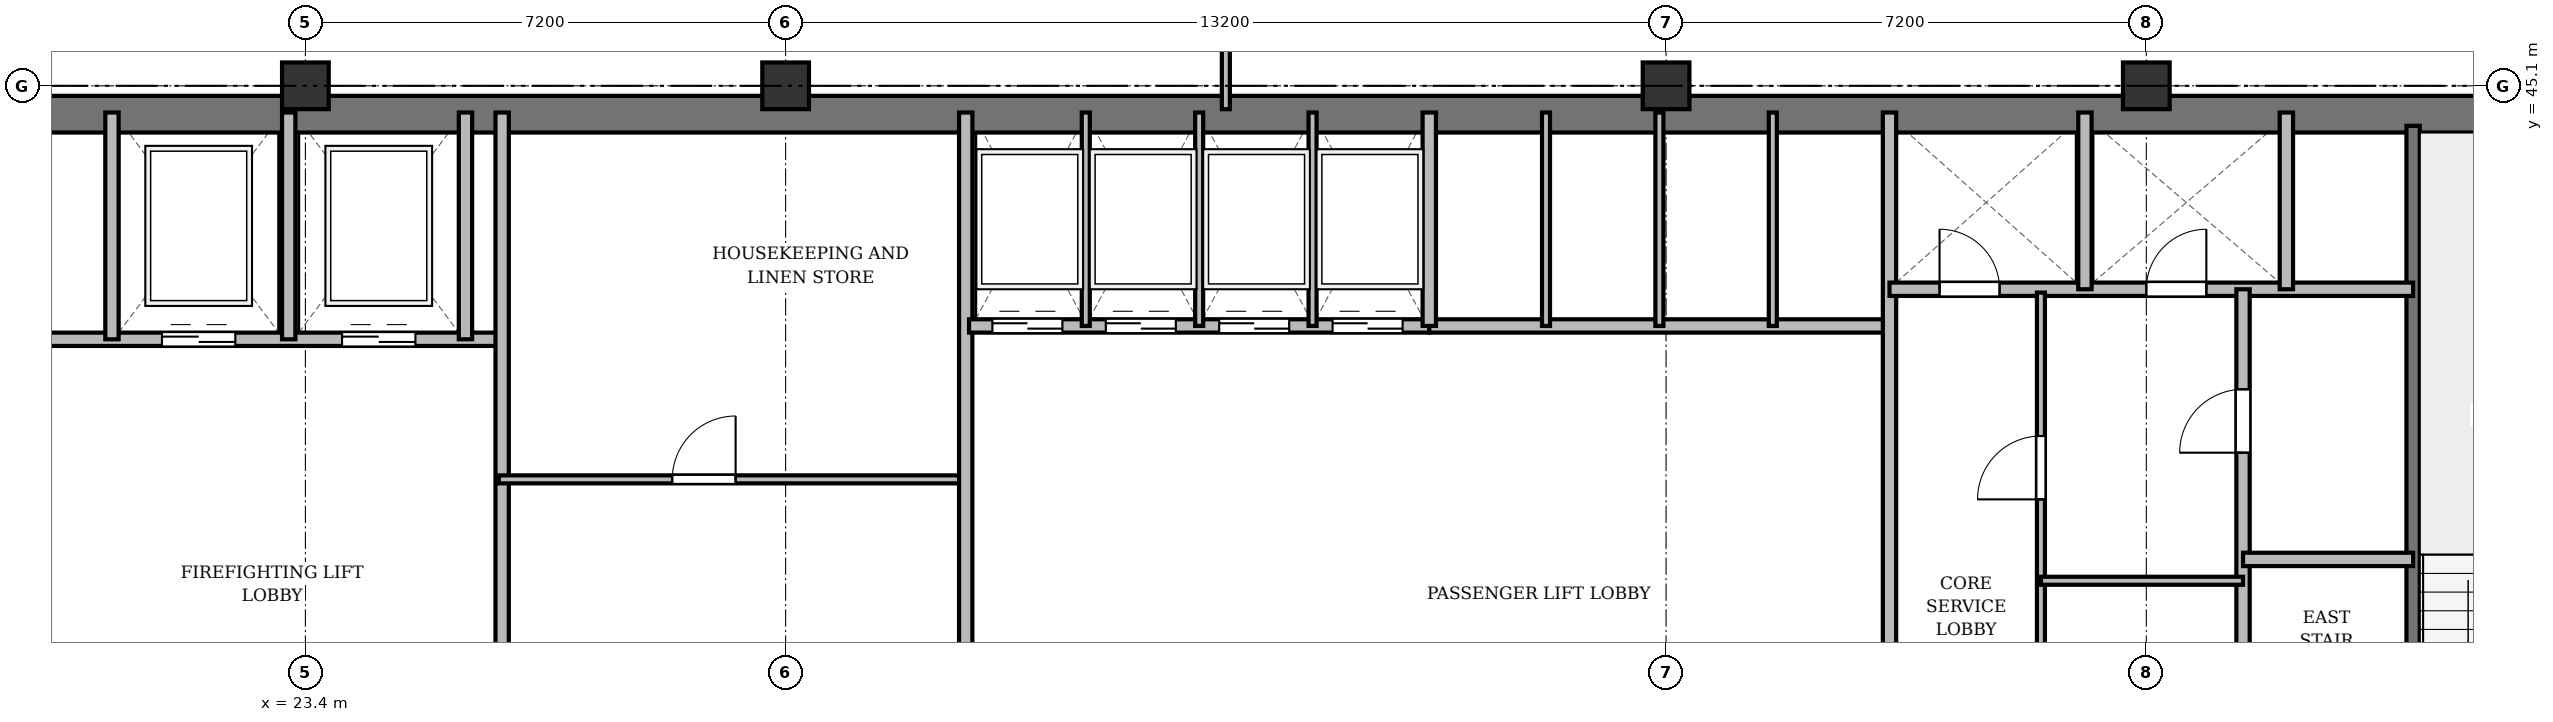
"""IFC4 building model, lengths in metres.
Left out: names, types, materials, properties, quantities, classifications, styles, units other than length and angle.
Written with IfcOpenShell. Run it as: python <this file> out.ifc"""

import sys

from ifc_helpers import new_model, si_unit, direction, frame, frame_2d, origin, origin_2d, place, context, subcontext, project, spatial, rectangle, extrude, source, transform, mapped, element, fill, save


model = new_model("IFC4")
c1 = context("Model", 3, precision=1e-05, world=origin(), true_north=direction((0.0, 1.0)))
c2 = subcontext(c1, "Body", "Model", "MODEL_VIEW")
j1 = project(units=[si_unit("LENGTHUNIT", "METRE"), si_unit("PLANEANGLEUNIT", "RADIAN")], contexts=[c1])
p1 = place(None, origin())
s1 = spatial("IfcSite", under=j1, at=p1, CompositionType="ELEMENT")
p2 = place(p1, origin())
s2 = spatial("IfcBuilding", under=s1, at=p2, CompositionType="ELEMENT")
p3 = place(p2, frame((0.0, 0.0, 197.7)))
s3 = spatial("IfcBuildingStorey", under=s2, at=p3, CompositionType="ELEMENT", Elevation=197.7)
m1 = source(origin(), c2, "Body", "SweptSolid", [
    extrude(rectangle(XDim=0.7, YDim=0.7, at=origin_2d()), origin(), (0.0, 0.0, 1.0), 3.6),
])
for number, where, z_axis, x_axis in (
    (1, (23.4, 45.1, 0.0), (0.0, 0.0, 1.0), (1.0, 0.0, 0.0)),
    (2, (30.6, 45.1, 0.0), (0.0, 0.0, 1.0), (1.0, 0.0, 0.0)),
    (3, (43.8, 45.1, 0.0), (0.0, 0.0, 1.0), (1.0, 0.0, 0.0)),
    (4, (51.0, 45.1, 0.0), (0.0, 0.0, 1.0), (1.0, 0.0, 0.0)),
):
    element("IfcColumn", number, at=place(p3, frame(where, z_axis=z_axis, x_axis=x_axis)), inside=s3, PredefinedType="COLUMN", context=c2, shape_type="MappedRepresentation", body=[
        mapped(m1, transform((0.0, 0.0, 0.0), x_axis=(1.0, 0.0, 0.0), y_axis=(0.0, 1.0, 0.0), z_axis=(0.0, 0.0, 1.0), scale=1.0)),
    ])
p4 = place(p3, frame((15.65, 44.675, 0.0), z_axis=(0.0, 0.0, 1.0), x_axis=(1.0, 0.0, 0.0)))
e5 = element("IfcWall", 5, at=p4, inside=s3, PredefinedType="SHEAR", context=c2, shape_type="SweptSolid", body=[
    extrude(rectangle(XDim=43.1, YDim=0.55, at=frame_2d((21.55, 0.0))), origin(), (0.0, 0.0, 1.0), 3.36),
])
p5 = place(p3, frame((55.0, 33.4, 0.0), z_axis=(0.0, 0.0, 1.0), x_axis=(0.0, 1.0, 0.0)))
e6 = element("IfcWall", 6, at=p5, inside=s3, PredefinedType="SHEAR", context=c2, shape_type="SweptSolid", body=[
    extrude(rectangle(XDim=11.1, YDim=0.2, at=frame_2d((5.55, 0.0))), origin(), (0.0, 0.0, 1.0), 3.36),
])
p6 = place(p5, frame((0.85, 0.0, 0.0)))
e7 = element("IfcOpeningElement", 7, at=p6, cuts=e6, PredefinedType="OPENING", context=c2, shape_type="SweptSolid", body=[
    extrude(rectangle(XDim=1.1, YDim=2.15, at=frame_2d((0.55, 1.075))), frame((0.0, 0.11, 0.0), z_axis=(0.0, -1.0, 0.0), x_axis=(1.0, 0.0, 0.0)), (0.0, 0.0, 1.0), 0.22),
])
p7 = place(p3, frame((19.55, 41.3, 0.0), z_axis=(0.0, 0.0, 1.0), x_axis=(1.0, 0.0, 0.0)))
e8 = element("IfcWall", 8, at=p7, inside=s3, PredefinedType="SOLIDWALL", context=c2, shape_type="SweptSolid", body=[
    extrude(rectangle(XDim=6.75, YDim=0.2, at=frame_2d((3.375, 0.0))), origin(), (0.0, 0.0, 1.0), 3.36),
])
p8 = place(p7, frame((1.7, 0.0, 0.0)))
e9 = element("IfcOpeningElement", 9, at=p8, cuts=e8, PredefinedType="OPENING", context=c2, shape_type="SweptSolid", body=[
    extrude(rectangle(XDim=1.1, YDim=2.15, at=frame_2d((0.55, 1.075))), frame((0.0, 0.11, 0.0), z_axis=(0.0, -1.0, 0.0), x_axis=(1.0, 0.0, 0.0)), (0.0, 0.0, 1.0), 0.22),
])
p9 = place(p7, frame((4.4, 0.0, 0.0)))
e10 = element("IfcOpeningElement", 10, at=p9, cuts=e8, PredefinedType="OPENING", context=c2, shape_type="SweptSolid", body=[
    extrude(rectangle(XDim=1.1, YDim=2.15, at=frame_2d((0.55, 1.075))), frame((0.0, 0.11, 0.0), z_axis=(0.0, -1.0, 0.0), x_axis=(1.0, 0.0, 0.0)), (0.0, 0.0, 1.0), 0.22),
])
for number, where, z_axis, x_axis in (
    (11, (20.5, 41.3, 0.0), (0.0, 0.0, 1.0), (0.0, 1.0, 0.0)),
    (12, (23.15, 41.3, 0.0), (0.0, 0.0, 1.0), (0.0, 1.0, 0.0)),
    (13, (25.8, 41.3, 0.0), (0.0, 0.0, 1.0), (0.0, 1.0, 0.0)),
):
    element("IfcWall", number, at=place(p3, frame(where, z_axis=z_axis, x_axis=x_axis)), inside=s3, PredefinedType="SOLIDWALL", context=c2, shape_type="SweptSolid", body=[
        extrude(rectangle(XDim=3.4, YDim=0.2, at=frame_2d((1.7, 0.0))), origin(), (0.0, 0.0, 1.0), 3.36),
    ])
p10 = place(p3, frame((26.35, 33.4, 0.0), z_axis=(0.0, 0.0, 1.0), x_axis=(0.0, 1.0, 0.0)))
e14 = element("IfcWall", 14, at=p10, inside=s3, PredefinedType="SOLIDWALL", context=c2, shape_type="SweptSolid", body=[
    extrude(rectangle(XDim=11.3, YDim=0.2, at=frame_2d((5.65, 0.0))), origin(), (0.0, 0.0, 1.0), 2.91),
])
p11 = place(p3, frame((26.3, 39.2, 0.0), z_axis=(0.0, 0.0, 1.0), x_axis=(1.0, 0.0, 0.0)))
e15 = element("IfcWall", 15, at=p11, inside=s3, PredefinedType="PARTITIONING", context=c2, shape_type="SweptSolid", body=[
    extrude(rectangle(XDim=7.0, YDim=0.12, at=frame_2d((3.5, 0.0))), origin(), (0.0, 0.0, 1.0), 2.86),
])
p12 = place(p11, frame((2.6, 0.0, 0.0)))
e16 = element("IfcOpeningElement", 16, at=p12, cuts=e15, PredefinedType="OPENING", context=c2, shape_type="SweptSolid", body=[
    extrude(rectangle(XDim=0.95, YDim=2.15, at=frame_2d((0.475, 1.075))), frame((0.0, 0.07, 0.0), z_axis=(0.0, -1.0, 0.0), x_axis=(1.0, 0.0, 0.0)), (0.0, 0.0, 1.0), 0.14),
])
p13 = place(p3, frame((33.3, 33.4, 0.0), z_axis=(0.0, 0.0, 1.0), x_axis=(0.0, 1.0, 0.0)))
e17 = element("IfcWall", 17, at=p13, inside=s3, PredefinedType="SOLIDWALL", context=c2, shape_type="SweptSolid", body=[
    extrude(rectangle(XDim=11.3, YDim=0.2, at=frame_2d((5.65, 0.0))), origin(), (0.0, 0.0, 1.0), 2.91),
])
p14 = place(p3, frame((33.35, 41.5, 0.0), z_axis=(0.0, 0.0, 1.0), x_axis=(1.0, 0.0, 0.0)))
e18 = element("IfcWall", 18, at=p14, inside=s3, PredefinedType="SOLIDWALL", context=c2, shape_type="SweptSolid", body=[
    extrude(rectangle(XDim=6.9, YDim=0.2, at=frame_2d((3.45, 0.0))), origin(), (0.0, 0.0, 1.0), 3.36),
])
p15 = place(p14, frame((0.35, 0.0, 0.0)))
e19 = element("IfcOpeningElement", 19, at=p15, cuts=e18, PredefinedType="OPENING", context=c2, shape_type="SweptSolid", body=[
    extrude(rectangle(XDim=1.05, YDim=2.15, at=frame_2d((0.525, 1.075))), frame((0.0, 0.11, 0.0), z_axis=(0.0, -1.0, 0.0), x_axis=(1.0, 0.0, 0.0)), (0.0, 0.0, 1.0), 0.22),
])
p16 = place(p14, frame((2.05, 0.0, 0.0)))
e20 = element("IfcOpeningElement", 20, at=p16, cuts=e18, PredefinedType="OPENING", context=c2, shape_type="SweptSolid", body=[
    extrude(rectangle(XDim=1.05, YDim=2.15, at=frame_2d((0.525, 1.075))), frame((0.0, 0.11, 0.0), z_axis=(0.0, -1.0, 0.0), x_axis=(1.0, 0.0, 0.0)), (0.0, 0.0, 1.0), 0.22),
])
p17 = place(p14, frame((3.75, 0.0, 0.0)))
e21 = element("IfcOpeningElement", 21, at=p17, cuts=e18, PredefinedType="OPENING", context=c2, shape_type="SweptSolid", body=[
    extrude(rectangle(XDim=1.05, YDim=2.15, at=frame_2d((0.525, 1.075))), frame((0.0, 0.11, 0.0), z_axis=(0.0, -1.0, 0.0), x_axis=(1.0, 0.0, 0.0)), (0.0, 0.0, 1.0), 0.22),
])
p18 = place(p14, frame((5.45, 0.0, 0.0)))
e22 = element("IfcOpeningElement", 22, at=p18, cuts=e18, PredefinedType="OPENING", context=c2, shape_type="SweptSolid", body=[
    extrude(rectangle(XDim=1.05, YDim=2.15, at=frame_2d((0.525, 1.075))), frame((0.0, 0.11, 0.0), z_axis=(0.0, -1.0, 0.0), x_axis=(1.0, 0.0, 0.0)), (0.0, 0.0, 1.0), 0.22),
])
for number, where, z_axis, x_axis in (
    (23, (35.1, 41.5, 0.0), (0.0, 0.0, 1.0), (0.0, 1.0, 0.0)),
    (24, (36.8, 41.5, 0.0), (0.0, 0.0, 1.0), (0.0, 1.0, 0.0)),
    (25, (38.5, 41.5, 0.0), (0.0, 0.0, 1.0), (0.0, 1.0, 0.0)),
):
    element("IfcWall", number, at=place(p3, frame(where, z_axis=z_axis, x_axis=x_axis)), inside=s3, PredefinedType="PARTITIONING", context=c2, shape_type="SweptSolid", body=[
        extrude(rectangle(XDim=3.2, YDim=0.12, at=frame_2d((1.6, 0.0))), origin(), (0.0, 0.0, 1.0), 3.36),
    ])
p19 = place(p3, frame((40.25, 41.5, 0.0), z_axis=(0.0, 0.0, 1.0), x_axis=(1.0, 0.0, 0.0)))
e26 = element("IfcWall", 26, at=p19, inside=s3, PredefinedType="SOLIDWALL", context=c2, shape_type="SweptSolid", body=[
    extrude(rectangle(XDim=6.9, YDim=0.2, at=frame_2d((3.45, 0.0))), origin(), (0.0, 0.0, 1.0), 2.86),
])
p20 = place(p3, frame((40.25, 41.5, 0.0), z_axis=(0.0, 0.0, 1.0), x_axis=(0.0, 1.0, 0.0)))
e27 = element("IfcWall", 27, at=p20, inside=s3, PredefinedType="SOLIDWALL", context=c2, shape_type="SweptSolid", body=[
    extrude(rectangle(XDim=3.2, YDim=0.2, at=frame_2d((1.6, 0.0))), origin(), (0.0, 0.0, 1.0), 3.36),
])
p21 = place(p3, frame((42.0, 41.5, 0.0), z_axis=(0.0, 0.0, 1.0), x_axis=(0.0, 1.0, 0.0)))
e28 = element("IfcWall", 28, at=p21, inside=s3, PredefinedType="PARTITIONING", context=c2, shape_type="SweptSolid", body=[
    extrude(rectangle(XDim=3.2, YDim=0.12, at=frame_2d((1.6, 0.0))), origin(), (0.0, 0.0, 1.0), 3.36),
])
p22 = place(p3, frame((43.7, 41.5, 0.0), z_axis=(0.0, 0.0, 1.0), x_axis=(0.0, 1.0, 0.0)))
e29 = element("IfcWall", 29, at=p22, inside=s3, PredefinedType="PARTITIONING", context=c2, shape_type="SweptSolid", body=[
    extrude(rectangle(XDim=3.2, YDim=0.12, at=frame_2d((1.6, 0.0))), origin(), (0.0, 0.0, 1.0), 2.86),
])
p23 = place(p3, frame((45.4, 41.5, 0.0), z_axis=(0.0, 0.0, 1.0), x_axis=(0.0, 1.0, 0.0)))
e30 = element("IfcWall", 30, at=p23, inside=s3, PredefinedType="PARTITIONING", context=c2, shape_type="SweptSolid", body=[
    extrude(rectangle(XDim=3.2, YDim=0.12, at=frame_2d((1.6, 0.0))), origin(), (0.0, 0.0, 1.0), 3.36),
])
p24 = place(p3, frame((47.15, 33.4, 0.0), z_axis=(0.0, 0.0, 1.0), x_axis=(0.0, 1.0, 0.0)))
e31 = element("IfcWall", 31, at=p24, inside=s3, PredefinedType="SOLIDWALL", context=c2, shape_type="SweptSolid", body=[
    extrude(rectangle(XDim=11.3, YDim=0.2, at=frame_2d((5.65, 0.0))), origin(), (0.0, 0.0, 1.0), 2.91),
])
p25 = place(p3, frame((47.15, 42.05, 0.0), z_axis=(0.0, 0.0, 1.0), x_axis=(1.0, 0.0, 0.0)))
e32 = element("IfcWall", 32, at=p25, inside=s3, PredefinedType="SOLIDWALL", context=c2, shape_type="SweptSolid", body=[
    extrude(rectangle(XDim=7.85, YDim=0.2, at=frame_2d((3.925, 0.0))), origin(), (0.0, 0.0, 1.0), 2.86),
])
p26 = place(p25, frame((0.75, 0.0, 0.0)))
e33 = element("IfcOpeningElement", 33, at=p26, cuts=e32, PredefinedType="OPENING", context=c2, shape_type="SweptSolid", body=[
    extrude(rectangle(XDim=0.9, YDim=2.1, at=frame_2d((0.45, 1.05))), frame((0.0, 0.11, 0.0), z_axis=(0.0, -1.0, 0.0), x_axis=(1.0, 0.0, 0.0)), (0.0, 0.0, 1.0), 0.22),
])
p27 = place(p25, frame((3.85, 0.0, 0.0)))
e34 = element("IfcOpeningElement", 34, at=p27, cuts=e32, PredefinedType="OPENING", context=c2, shape_type="SweptSolid", body=[
    extrude(rectangle(XDim=0.9, YDim=2.1, at=frame_2d((0.45, 1.05))), frame((0.0, 0.11, 0.0), z_axis=(0.0, -1.0, 0.0), x_axis=(1.0, 0.0, 0.0)), (0.0, 0.0, 1.0), 0.22),
])
for number, where, z_axis, x_axis in (
    (35, (50.08, 42.05, 0.0), (0.0, 0.0, 1.0), (0.0, 1.0, 0.0)),
    (36, (53.1, 42.05, 0.0), (0.0, 0.0, 1.0), (0.0, 1.0, 0.0)),
):
    element("IfcWall", number, at=place(p3, frame(where, z_axis=z_axis, x_axis=x_axis)), inside=s3, PredefinedType="SOLIDWALL", context=c2, shape_type="SweptSolid", body=[
        extrude(rectangle(XDim=2.65, YDim=0.2, at=frame_2d((1.325, 0.0))), origin(), (0.0, 0.0, 1.0), 3.36),
    ])
p28 = place(p3, frame((52.45, 33.4, 0.0), z_axis=(0.0, 0.0, 1.0), x_axis=(0.0, 1.0, 0.0)))
e37 = element("IfcWall", 37, at=p28, inside=s3, PredefinedType="PARTITIONING", context=c2, shape_type="SweptSolid", body=[
    extrude(rectangle(XDim=8.65, YDim=0.2, at=frame_2d((4.325, 0.0))), origin(), (0.0, 0.0, 1.0), 2.91),
])
p29 = place(p28, frame((6.2, 0.0, 0.0)))
e38 = element("IfcOpeningElement", 38, at=p29, cuts=e37, PredefinedType="OPENING", context=c2, shape_type="SweptSolid", body=[
    extrude(rectangle(XDim=0.95, YDim=2.15, at=frame_2d((0.475, 1.075))), frame((0.0, 0.11, 0.0), z_axis=(0.0, -1.0, 0.0), x_axis=(1.0, 0.0, 0.0)), (0.0, 0.0, 1.0), 0.22),
])
p30 = place(p3, frame((52.45, 38.0, 0.0), z_axis=(0.0, 0.0, 1.0), x_axis=(1.0, 0.0, 0.0)))
e39 = element("IfcWall", 39, at=p30, inside=s3, PredefinedType="PARTITIONING", context=c2, shape_type="SweptSolid", body=[
    extrude(rectangle(XDim=2.55, YDim=0.2, at=frame_2d((1.275, 0.0))), origin(), (0.0, 0.0, 1.0), 3.36),
])
p31 = place(p3, frame((49.42, 33.4, 0.0), z_axis=(0.0, 0.0, 1.0), x_axis=(0.0, 1.0, 0.0)))
e40 = element("IfcWall", 40, at=p31, inside=s3, PredefinedType="PARTITIONING", context=c2, shape_type="SweptSolid", body=[
    extrude(rectangle(XDim=8.6, YDim=0.12, at=frame_2d((4.3, 0.0))), origin(), (0.0, 0.0, 1.0), 2.91),
])
p32 = place(p31, frame((1.3, 0.0, 0.0)))
e41 = element("IfcOpeningElement", 41, at=p32, cuts=e40, PredefinedType="OPENING", context=c2, shape_type="SweptSolid", body=[
    extrude(rectangle(XDim=0.95, YDim=2.15, at=frame_2d((0.475, 1.075))), frame((0.0, 0.07, 0.0), z_axis=(0.0, -1.0, 0.0), x_axis=(1.0, 0.0, 0.0)), (0.0, 0.0, 1.0), 0.14),
])
p33 = place(p31, frame((5.5, 0.0, 0.0)))
e42 = element("IfcOpeningElement", 42, at=p33, cuts=e40, PredefinedType="OPENING", context=c2, shape_type="SweptSolid", body=[
    extrude(rectangle(XDim=0.95, YDim=2.15, at=frame_2d((0.475, 1.075))), frame((0.0, 0.07, 0.0), z_axis=(0.0, -1.0, 0.0), x_axis=(1.0, 0.0, 0.0)), (0.0, 0.0, 1.0), 0.14),
])
p34 = place(p3, frame((49.42, 37.68, 0.0), z_axis=(0.0, 0.0, 1.0), x_axis=(1.0, 0.0, 0.0)))
e43 = element("IfcWall", 43, at=p34, inside=s3, PredefinedType="PARTITIONING", context=c2, shape_type="SweptSolid", body=[
    extrude(rectangle(XDim=3.03, YDim=0.12, at=frame_2d((1.515, 0.0))), origin(), (0.0, 0.0, 1.0), 2.86),
])
p35 = place(p3, frame((37.2, 44.75, 0.0), z_axis=(0.0, 0.0, 1.0), x_axis=(0.0, 1.0, 0.0)))
e44 = element("IfcWall", 44, at=p35, inside=s3, PredefinedType="PARTITIONING", context=c2, shape_type="SweptSolid", body=[
    extrude(rectangle(XDim=3.61, YDim=0.12, at=frame_2d((1.805, 0.0))), origin(), (0.0, 0.0, 1.0), 2.91),
])
p36 = place(p35, frame((1.1, 0.0, 0.0)))
e45 = element("IfcOpeningElement", 45, at=p36, cuts=e44, PredefinedType="OPENING", context=c2, shape_type="SweptSolid", body=[
    extrude(rectangle(XDim=0.95, YDim=2.15, at=frame_2d((0.475, 1.075))), frame((0.0, 0.07, 0.0), z_axis=(0.0, -1.0, 0.0), x_axis=(1.0, 0.0, 0.0)), (0.0, 0.0, 1.0), 0.14),
])
m2 = source(origin(), c2, "Body", "SweptSolid", [
    extrude(rectangle(XDim=1.1, YDim=2.15, at=frame_2d((0.55, 1.075))), frame((0.0, 0.025, 0.0), z_axis=(0.0, -1.0, 0.0), x_axis=(1.0, 0.0, 0.0)), (0.0, 0.0, 1.0), 0.05),
])
p37 = place(p8, origin())
e46 = element("IfcDoor", 46, at=p37, inside=s3, OperationType="DOUBLE_DOOR_SLIDING", PredefinedType="DOOR", context=c2, shape_type="MappedRepresentation", body=[
    mapped(m2, transform((0.0, 0.0, 0.0), x_axis=(1.0, 0.0, 0.0), y_axis=(0.0, 1.0, 0.0), z_axis=(0.0, 0.0, 1.0), scale=1.0)),
])
fill(e9, e46)
p38 = place(p9, origin())
e47 = element("IfcDoor", 47, at=p38, inside=s3, OperationType="DOUBLE_DOOR_SLIDING", PredefinedType="DOOR", context=c2, shape_type="MappedRepresentation", body=[
    mapped(m2, transform((0.0, 0.0, 0.0), x_axis=(1.0, 0.0, 0.0), y_axis=(0.0, 1.0, 0.0), z_axis=(0.0, 0.0, 1.0), scale=1.0)),
])
fill(e10, e47)
m3 = source(origin(), c2, "Body", "SweptSolid", [
    extrude(rectangle(XDim=0.95, YDim=2.15, at=frame_2d((0.475, 1.075))), frame((0.0, 0.025, 0.0), z_axis=(0.0, -1.0, 0.0), x_axis=(1.0, 0.0, 0.0)), (0.0, 0.0, 1.0), 0.05),
])
p39 = place(p12, origin())
e48 = element("IfcDoor", 48, at=p39, inside=s3, OperationType="SINGLE_SWING_RIGHT", PredefinedType="DOOR", context=c2, shape_type="MappedRepresentation", body=[
    mapped(m3, transform((0.0, 0.0, 0.0), x_axis=(1.0, 0.0, 0.0), y_axis=(0.0, 1.0, 0.0), z_axis=(0.0, 0.0, 1.0), scale=1.0)),
])
fill(e16, e48)
m4 = source(origin(), c2, "Body", "SweptSolid", [
    extrude(rectangle(XDim=1.05, YDim=2.15, at=frame_2d((0.525, 1.075))), frame((0.0, 0.025, 0.0), z_axis=(0.0, -1.0, 0.0), x_axis=(1.0, 0.0, 0.0)), (0.0, 0.0, 1.0), 0.05),
])
p40 = place(p15, origin())
e49 = element("IfcDoor", 49, at=p40, inside=s3, OperationType="DOUBLE_DOOR_SLIDING", PredefinedType="DOOR", context=c2, shape_type="MappedRepresentation", body=[
    mapped(m4, transform((0.0, 0.0, 0.0), x_axis=(1.0, 0.0, 0.0), y_axis=(0.0, 1.0, 0.0), z_axis=(0.0, 0.0, 1.0), scale=1.0)),
])
fill(e19, e49)
p41 = place(p16, origin())
e50 = element("IfcDoor", 50, at=p41, inside=s3, OperationType="DOUBLE_DOOR_SLIDING", PredefinedType="DOOR", context=c2, shape_type="MappedRepresentation", body=[
    mapped(m4, transform((0.0, 0.0, 0.0), x_axis=(1.0, 0.0, 0.0), y_axis=(0.0, 1.0, 0.0), z_axis=(0.0, 0.0, 1.0), scale=1.0)),
])
fill(e20, e50)
p42 = place(p17, origin())
e51 = element("IfcDoor", 51, at=p42, inside=s3, OperationType="DOUBLE_DOOR_SLIDING", PredefinedType="DOOR", context=c2, shape_type="MappedRepresentation", body=[
    mapped(m4, transform((0.0, 0.0, 0.0), x_axis=(1.0, 0.0, 0.0), y_axis=(0.0, 1.0, 0.0), z_axis=(0.0, 0.0, 1.0), scale=1.0)),
])
fill(e21, e51)
p43 = place(p18, origin())
e52 = element("IfcDoor", 52, at=p43, inside=s3, OperationType="DOUBLE_DOOR_SLIDING", PredefinedType="DOOR", context=c2, shape_type="MappedRepresentation", body=[
    mapped(m4, transform((0.0, 0.0, 0.0), x_axis=(1.0, 0.0, 0.0), y_axis=(0.0, 1.0, 0.0), z_axis=(0.0, 0.0, 1.0), scale=1.0)),
])
fill(e22, e52)
m5 = source(origin(), c2, "Body", "SweptSolid", [
    extrude(rectangle(XDim=0.9, YDim=2.1, at=frame_2d((0.45, 1.05))), frame((0.0, 0.025, 0.0), z_axis=(0.0, -1.0, 0.0), x_axis=(1.0, 0.0, 0.0)), (0.0, 0.0, 1.0), 0.05),
])
p44 = place(p26, origin())
e53 = element("IfcDoor", 53, at=p44, inside=s3, OperationType="SINGLE_SWING_LEFT", PredefinedType="DOOR", context=c2, shape_type="MappedRepresentation", body=[
    mapped(m5, transform((0.0, 0.0, 0.0), x_axis=(1.0, 0.0, 0.0), y_axis=(0.0, 1.0, 0.0), z_axis=(0.0, 0.0, 1.0), scale=1.0)),
])
fill(e33, e53)
p45 = place(p27, origin())
e54 = element("IfcDoor", 54, at=p45, inside=s3, OperationType="SINGLE_SWING_RIGHT", PredefinedType="DOOR", context=c2, shape_type="MappedRepresentation", body=[
    mapped(m5, transform((0.0, 0.0, 0.0), x_axis=(1.0, 0.0, 0.0), y_axis=(0.0, 1.0, 0.0), z_axis=(0.0, 0.0, 1.0), scale=1.0)),
])
fill(e34, e54)
p46 = place(p29, origin())
e55 = element("IfcDoor", 55, at=p46, inside=s3, OperationType="SINGLE_SWING_LEFT", PredefinedType="DOOR", context=c2, shape_type="MappedRepresentation", body=[
    mapped(m3, transform((0.0, 0.0, 0.0), x_axis=(1.0, 0.0, 0.0), y_axis=(0.0, 1.0, 0.0), z_axis=(0.0, 0.0, 1.0), scale=1.0)),
])
fill(e38, e55)
p47 = place(p33, origin())
e56 = element("IfcDoor", 56, at=p47, inside=s3, OperationType="SINGLE_SWING_LEFT", PredefinedType="DOOR", context=c2, shape_type="MappedRepresentation", body=[
    mapped(m3, transform((0.0, 0.0, 0.0), x_axis=(1.0, 0.0, 0.0), y_axis=(0.0, 1.0, 0.0), z_axis=(0.0, 0.0, 1.0), scale=1.0)),
])
fill(e42, e56)
save(model, sys.argv[1])
